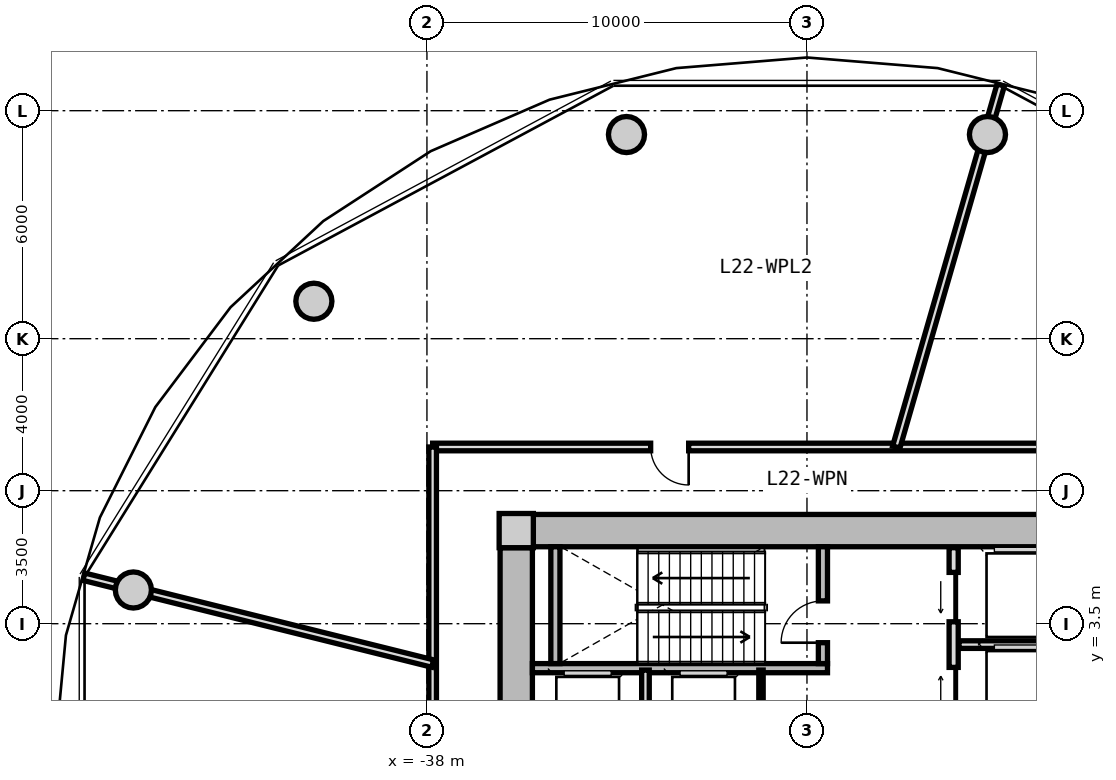
"""IFC4 building model, lengths in metres.
Left out: names, types, materials, properties, quantities, classifications, styles, units other than length and angle.
Written with IfcOpenShell. Run it as: python <this file> out.ifc"""

import sys

from ifc_helpers import new_model, si_unit, direction, frame, frame_2d, origin, origin_2d, place, context, subcontext, project, spatial, rectangle, circle, extrude, source, transform, mapped, element, fill, save


model = new_model("IFC4")
c1 = context("Model", 3, precision=1e-05, world=origin(), true_north=direction((0.0, 1.0)))
c2 = subcontext(c1, "Body", "Model", "MODEL_VIEW")
j1 = project(units=[si_unit("LENGTHUNIT", "METRE"), si_unit("PLANEANGLEUNIT", "RADIAN")], contexts=[c1])
p1 = place(None, origin())
s1 = spatial("IfcSite", under=j1, at=p1, CompositionType="ELEMENT")
p2 = place(p1, origin())
s2 = spatial("IfcBuilding", under=s1, at=p2, CompositionType="ELEMENT")
p3 = place(p2, frame((0.0, 0.0, 73.45)))
s3 = spatial("IfcBuildingStorey", under=s2, at=p3, CompositionType="ELEMENT", Elevation=73.45)
m1 = source(origin(), c2, "Body", "SweptSolid", [
    extrude(rectangle(XDim=0.9, YDim=0.9, at=origin_2d()), origin(), (0.0, 0.0, 1.0), 4.5),
])
p4 = place(p3, frame((-35.65, 5.95, 0.0), z_axis=(0.0, 0.0, 1.0), x_axis=(1.0, 0.0, 0.0)))
e1 = element("IfcColumn", 1, at=p4, inside=s3, PredefinedType="COLUMN", context=c2, shape_type="MappedRepresentation", body=[
    mapped(m1, transform((0.0, 0.0, 0.0), x_axis=(1.0, 0.0, 0.0), y_axis=(0.0, 1.0, 0.0), z_axis=(0.0, 0.0, 1.0), scale=1.0)),
])
m2 = source(origin(), c2, "Body", "SweptSolid", [
    extrude(rectangle(XDim=14.4, YDim=0.85, at=frame_2d((7.2, 0.0))), origin(), (0.0, 0.0, 1.0), 4.08),
])
p5 = place(p3, frame((-35.2, 5.95, 0.0), z_axis=(0.0, 0.0, 1.0), x_axis=(1.0, 0.0, 0.0)))
e2 = element("IfcWall", 2, at=p5, inside=s3, PredefinedType="SHEAR", context=c2, shape_type="MappedRepresentation", body=[
    mapped(m2, transform((0.0, 0.0, 0.0), x_axis=(1.0, 0.0, 0.0), y_axis=(0.0, 1.0, 0.0), z_axis=(0.0, 0.0, 1.0), scale=1.0)),
])
m3 = source(origin(), c2, "Body", "SweptSolid", [
    extrude(rectangle(XDim=11.0, YDim=0.85, at=frame_2d((5.5, 0.0))), origin(), (0.0, 0.0, 1.0), 4.08),
])
p6 = place(p3, frame((-35.65, -5.5, 0.0), z_axis=(0.0, 0.0, 1.0), x_axis=(0.0, 1.0, 0.0)))
e3 = element("IfcWall", 3, at=p6, inside=s3, PredefinedType="SHEAR", context=c2, shape_type="MappedRepresentation", body=[
    mapped(m3, transform((0.0, 0.0, 0.0), x_axis=(1.0, 0.0, 0.0), y_axis=(0.0, 1.0, 0.0), z_axis=(0.0, 0.0, 1.0), scale=1.0)),
])
p7 = place(p6, frame((3.8, 0.0, 0.0)))
e4 = element("IfcOpeningElement", 4, at=p7, cuts=e3, PredefinedType="OPENING", context=c2, shape_type="SweptSolid", body=[
    extrude(rectangle(XDim=1.2, YDim=2.15, at=frame_2d((0.6, 1.075))), frame((0.0, 0.435, 0.0), z_axis=(0.0, -1.0, 0.0), x_axis=(1.0, 0.0, 0.0)), (0.0, 0.0, 1.0), 0.87),
])
m4 = source(origin(), c2, "Body", "SweptSolid", [
    extrude(circle(Radius=0.475, at=origin_2d()), origin(), (0.0, 0.0, 1.0), 4.08),
])
for number, where, z_axis, x_axis in (
    (5, (-23.251, 16.373, 0.0), (0.0, 0.0, 1.0), (1.0, 0.0, 0.0)),
    (6, (-32.749, 16.373, 0.0), (0.0, 0.0, 1.0), (1.0, 0.0, 0.0)),
    (7, (-40.975, 11.985, 0.0), (0.0, 0.0, 1.0), (1.0, 0.0, 0.0)),
    (8, (-45.725, 4.387, 0.0), (0.0, 0.0, 1.0), (1.0, 0.0, 0.0)),
):
    element("IfcColumn", number, at=place(p3, frame(where, z_axis=z_axis, x_axis=x_axis)), inside=s3, PredefinedType="COLUMN", context=c2, shape_type="MappedRepresentation", body=[
        mapped(m4, transform((0.0, 0.0, 0.0), x_axis=(1.0, 0.0, 0.0), y_axis=(0.0, 1.0, 0.0), z_axis=(0.0, 0.0, 1.0), scale=1.0)),
    ])
m5 = source(origin(), c2, "Body", "SweptSolid", [
    extrude(rectangle(XDim=7.765, YDim=0.24, at=frame_2d((3.883, 0.0))), origin(), (0.0, 0.0, 1.0), 4.08),
])
p8 = place(p3, frame((-35.225, 2.33, 0.0), z_axis=(0.0, 0.0, 1.0), x_axis=(1.0, 0.0, 0.0)))
e9 = element("IfcWall", 9, at=p8, inside=s3, PredefinedType="PARTITIONING", context=c2, shape_type="MappedRepresentation", body=[
    mapped(m5, transform((0.0, 0.0, 0.0), x_axis=(1.0, 0.0, 0.0), y_axis=(0.0, 1.0, 0.0), z_axis=(0.0, 0.0, 1.0), scale=1.0)),
])
m6 = source(origin(), c2, "Body", "SweptSolid", [
    extrude(rectangle(XDim=3.075, YDim=0.24, at=frame_2d((1.538, 0.0))), origin(), (0.0, 0.0, 1.0), 4.08),
])
p9 = place(p3, frame((-34.62, 2.45, 0.0), z_axis=(0.0, 0.0, 1.0), x_axis=(0.0, 1.0, 0.0)))
e10 = element("IfcWall", 10, at=p9, inside=s3, PredefinedType="PARTITIONING", context=c2, shape_type="MappedRepresentation", body=[
    mapped(m6, transform((0.0, 0.0, 0.0), x_axis=(1.0, 0.0, 0.0), y_axis=(0.0, 1.0, 0.0), z_axis=(0.0, 0.0, 1.0), scale=1.0)),
])
p10 = place(p3, frame((-27.58, 2.45, 0.0), z_axis=(0.0, 0.0, 1.0), x_axis=(0.0, 1.0, 0.0)))
e11 = element("IfcWall", 11, at=p10, inside=s3, PredefinedType="PARTITIONING", context=c2, shape_type="MappedRepresentation", body=[
    mapped(m6, transform((0.0, 0.0, 0.0), x_axis=(1.0, 0.0, 0.0), y_axis=(0.0, 1.0, 0.0), z_axis=(0.0, 0.0, 1.0), scale=1.0)),
])
p11 = place(p10, frame((0.55, 0.0, 0.0)))
e12 = element("IfcOpeningElement", 12, at=p11, cuts=e11, PredefinedType="OPENING", context=c2, shape_type="SweptSolid", body=[
    extrude(rectangle(XDim=1.1, YDim=2.15, at=frame_2d((0.55, 1.075))), frame((0.0, 0.13, 0.0), z_axis=(0.0, -1.0, 0.0), x_axis=(1.0, 0.0, 0.0)), (0.0, 0.0, 1.0), 0.26),
])
m7 = source(origin(), c2, "Body", "SweptSolid", [
    extrude(rectangle(XDim=5.0, YDim=0.24, at=frame_2d((2.5, 0.0))), origin(), (0.0, 0.0, 1.0), 4.065),
])
p12 = place(p3, frame((-24.14, 0.5, 0.0), z_axis=(0.0, 0.0, 1.0), x_axis=(0.0, 1.0, 0.0)))
e13 = element("IfcWall", 13, at=p12, inside=s3, PredefinedType="PARTITIONING", context=c2, shape_type="MappedRepresentation", body=[
    mapped(m7, transform((0.0, 0.0, 0.0), x_axis=(1.0, 0.0, 0.0), y_axis=(0.0, 1.0, 0.0), z_axis=(0.0, 0.0, 1.0), scale=1.0)),
])
p13 = place(p12, frame((3.05, 0.0, 0.0)))
e14 = element("IfcOpeningElement", 14, at=p13, cuts=e13, PredefinedType="OPENING", context=c2, shape_type="SweptSolid", body=[
    extrude(rectangle(XDim=1.3, YDim=2.2, at=frame_2d((0.65, 1.1))), frame((0.0, 0.13, 0.0), z_axis=(0.0, -1.0, 0.0), x_axis=(1.0, 0.0, 0.0)), (0.0, 0.0, 1.0), 0.26),
])
p14 = place(p12, frame((0.55, 0.0, 0.0)))
e15 = element("IfcOpeningElement", 15, at=p14, cuts=e13, PredefinedType="OPENING", context=c2, shape_type="SweptSolid", body=[
    extrude(rectangle(XDim=1.3, YDim=2.2, at=frame_2d((0.65, 1.1))), frame((0.0, 0.13, 0.0), z_axis=(0.0, -1.0, 0.0), x_axis=(1.0, 0.0, 0.0)), (0.0, 0.0, 1.0), 0.26),
])
m8 = source(origin(), c2, "Body", "SweptSolid", [
    extrude(rectangle(XDim=3.2, YDim=0.2, at=frame_2d((1.6, 0.0))), origin(), (0.0, 0.0, 1.0), 4.065),
])
p15 = place(p3, frame((-24.0, 2.95, 0.0), z_axis=(0.0, 0.0, 1.0), x_axis=(1.0, 0.0, 0.0)))
e16 = element("IfcWall", 16, at=p15, inside=s3, PredefinedType="PARTITIONING", context=c2, shape_type="MappedRepresentation", body=[
    mapped(m8, transform((0.0, 0.0, 0.0), x_axis=(1.0, 0.0, 0.0), y_axis=(0.0, 1.0, 0.0), z_axis=(0.0, 0.0, 1.0), scale=1.0)),
])
m9 = source(origin(), c2, "Body", "SweptSolid", [
    extrude(rectangle(XDim=2.33, YDim=0.115, at=frame_2d((1.165, 0.0))), origin(), (0.0, 0.0, 1.0), 4.065),
])
p16 = place(p3, frame((-29.21, -0.05, 0.0), z_axis=(0.0, 0.0, 1.0), x_axis=(0.0, 1.0, 0.0)))
e17 = element("IfcWall", 17, at=p16, inside=s3, PredefinedType="PARTITIONING", context=c2, shape_type="MappedRepresentation", body=[
    mapped(m9, transform((0.0, 0.0, 0.0), x_axis=(1.0, 0.0, 0.0), y_axis=(0.0, 1.0, 0.0), z_axis=(0.0, 0.0, 1.0), scale=1.0)),
])
m10 = source(origin(), c2, "Body", "SweptSolid", [
    extrude(rectangle(XDim=2.33, YDim=0.2, at=frame_2d((1.165, 0.0))), origin(), (0.0, 0.0, 1.0), 4.065),
])
p17 = place(p3, frame((-32.25, -0.05, 0.0), z_axis=(0.0, 0.0, 1.0), x_axis=(0.0, 1.0, 0.0)))
e18 = element("IfcWall", 18, at=p17, inside=s3, PredefinedType="PARTITIONING", context=c2, shape_type="MappedRepresentation", body=[
    mapped(m10, transform((0.0, 0.0, 0.0), x_axis=(1.0, 0.0, 0.0), y_axis=(0.0, 1.0, 0.0), z_axis=(0.0, 0.0, 1.0), scale=1.0)),
])
m11 = source(origin(), c2, "Body", "SweptSolid", [
    extrude(rectangle(XDim=19.7, YDim=0.2, at=frame_2d((9.85, 0.0))), origin(), (0.0, 0.0, 1.0), 4.065),
])
p18 = place(p3, frame((-37.85, 8.15, 0.0), z_axis=(0.0, 0.0, 1.0), x_axis=(1.0, 0.0, 0.0)))
e19 = element("IfcWall", 19, at=p18, inside=s3, PredefinedType="PARTITIONING", context=c2, shape_type="MappedRepresentation", body=[
    mapped(m11, transform((0.0, 0.0, 0.0), x_axis=(1.0, 0.0, 0.0), y_axis=(0.0, 1.0, 0.0), z_axis=(0.0, 0.0, 1.0), scale=1.0)),
])
p19 = place(p18, frame((5.737, 0.0, 0.0)))
e20 = element("IfcOpeningElement", 20, at=p19, cuts=e19, PredefinedType="OPENING", context=c2, shape_type="SweptSolid", body=[
    extrude(rectangle(XDim=1.0, YDim=2.1, at=frame_2d((0.5, 1.05))), frame((0.0, 0.11, 0.0), z_axis=(0.0, -1.0, 0.0), x_axis=(1.0, 0.0, 0.0)), (0.0, 0.0, 1.0), 0.22),
])
m12 = source(origin(), c2, "Body", "SweptSolid", [
    extrude(rectangle(XDim=16.3, YDim=0.2, at=frame_2d((8.15, 0.0))), origin(), (0.0, 0.0, 1.0), 4.065),
])
p20 = place(p3, frame((-37.85, -8.15, 0.0), z_axis=(0.0, 0.0, 1.0), x_axis=(0.0, 1.0, 0.0)))
e21 = element("IfcWall", 21, at=p20, inside=s3, PredefinedType="PARTITIONING", context=c2, shape_type="MappedRepresentation", body=[
    mapped(m12, transform((0.0, 0.0, 0.0), x_axis=(1.0, 0.0, 0.0), y_axis=(0.0, 1.0, 0.0), z_axis=(0.0, 0.0, 1.0), scale=1.0)),
])
p21 = place(p20, frame((4.953, 0.0, 0.0)))
e22 = element("IfcOpeningElement", 22, at=p21, cuts=e21, PredefinedType="OPENING", context=c2, shape_type="SweptSolid", body=[
    extrude(rectangle(XDim=1.0, YDim=2.1, at=frame_2d((0.5, 1.05))), frame((0.0, 0.11, 0.0), z_axis=(0.0, -1.0, 0.0), x_axis=(1.0, 0.0, 0.0)), (0.0, 0.0, 1.0), 0.22),
])
m13 = source(origin(), c2, "Body", "SweptSolid", [
    extrude(rectangle(XDim=9.915, YDim=0.2, at=frame_2d((4.958, 0.0))), origin(), (0.0, 0.0, 1.0), 4.065),
])
p22 = place(p3, frame((-25.649, 8.15, 0.0), z_axis=(0.0, 0.0, 1.0), x_axis=(0.277136607861, 0.960830526463, 0.0)))
e23 = element("IfcWall", 23, at=p22, inside=s3, PredefinedType="PARTITIONING", context=c2, shape_type="MappedRepresentation", body=[
    mapped(m13, transform((0.0, 0.0, 0.0), x_axis=(1.0, 0.0, 0.0), y_axis=(0.0, 1.0, 0.0), z_axis=(0.0, 0.0, 1.0), scale=1.0)),
])
m14 = source(origin(), c2, "Body", "SweptSolid", [
    extrude(rectangle(XDim=9.459, YDim=0.2, at=frame_2d((4.729, 0.0))), origin(), (0.0, 0.0, 1.0), 2.515),
])
p23 = place(p3, frame((-37.85, 2.452, 0.0), z_axis=(0.0, 0.0, 1.0), x_axis=(-0.970390989268, 0.241539495626, 0.0)))
e24 = element("IfcWall", 24, at=p23, inside=s3, PredefinedType="PARTITIONING", context=c2, shape_type="MappedRepresentation", body=[
    mapped(m14, transform((0.0, 0.0, 0.0), x_axis=(1.0, 0.0, 0.0), y_axis=(0.0, 1.0, 0.0), z_axis=(0.0, 0.0, 1.0), scale=1.0)),
])
m15 = source(origin(), c2, "Body", "SweptSolid", [
    extrude(rectangle(XDim=1.1, YDim=2.15, at=frame_2d((0.55, 1.075))), frame((0.0, 0.025, 0.0), z_axis=(0.0, -1.0, 0.0), x_axis=(1.0, 0.0, 0.0)), (0.0, 0.0, 1.0), 0.05),
])
p24 = place(p11, origin())
e25 = element("IfcDoor", 25, at=p24, inside=s3, OperationType="SINGLE_SWING_LEFT", PredefinedType="DOOR", context=c2, shape_type="MappedRepresentation", body=[
    mapped(m15, transform((0.0, 0.0, 0.0), x_axis=(1.0, 0.0, 0.0), y_axis=(0.0, 1.0, 0.0), z_axis=(0.0, 0.0, 1.0), scale=1.0)),
])
fill(e12, e25)
m16 = source(origin(), c2, "Body", "SweptSolid", [
    extrude(rectangle(XDim=1.3, YDim=2.2, at=frame_2d((0.65, 1.1))), frame((0.0, 0.025, 0.0), z_axis=(0.0, -1.0, 0.0), x_axis=(1.0, 0.0, 0.0)), (0.0, 0.0, 1.0), 0.05),
])
p25 = place(p13, origin())
e26 = element("IfcDoor", 26, at=p25, inside=s3, OperationType="SLIDING_TO_LEFT", PredefinedType="DOOR", context=c2, shape_type="MappedRepresentation", body=[
    mapped(m16, transform((0.0, 0.0, 0.0), x_axis=(1.0, 0.0, 0.0), y_axis=(0.0, 1.0, 0.0), z_axis=(0.0, 0.0, 1.0), scale=1.0)),
])
fill(e14, e26)
p26 = place(p14, origin())
e27 = element("IfcDoor", 27, at=p26, inside=s3, OperationType="SLIDING_TO_RIGHT", PredefinedType="DOOR", context=c2, shape_type="MappedRepresentation", body=[
    mapped(m16, transform((0.0, 0.0, 0.0), x_axis=(1.0, 0.0, 0.0), y_axis=(0.0, 1.0, 0.0), z_axis=(0.0, 0.0, 1.0), scale=1.0)),
])
fill(e15, e27)
m17 = source(origin(), c2, "Body", "SweptSolid", [
    extrude(rectangle(XDim=1.0, YDim=2.1, at=frame_2d((0.5, 1.05))), frame((0.0, 0.025, 0.0), z_axis=(0.0, -1.0, 0.0), x_axis=(1.0, 0.0, 0.0)), (0.0, 0.0, 1.0), 0.05),
])
p27 = place(p19, frame((1.0, 0.0, 0.0), z_axis=(0.0, 0.0, 1.0), x_axis=(-1.0, 0.0, 0.0)))
e28 = element("IfcDoor", 28, at=p27, inside=s3, OperationType="SINGLE_SWING_LEFT", PredefinedType="DOOR", context=c2, shape_type="MappedRepresentation", body=[
    mapped(m17, transform((0.0, 0.0, 0.0), x_axis=(1.0, 0.0, 0.0), y_axis=(0.0, 1.0, 0.0), z_axis=(0.0, 0.0, 1.0), scale=1.0)),
])
fill(e20, e28)
save(model, sys.argv[1])
